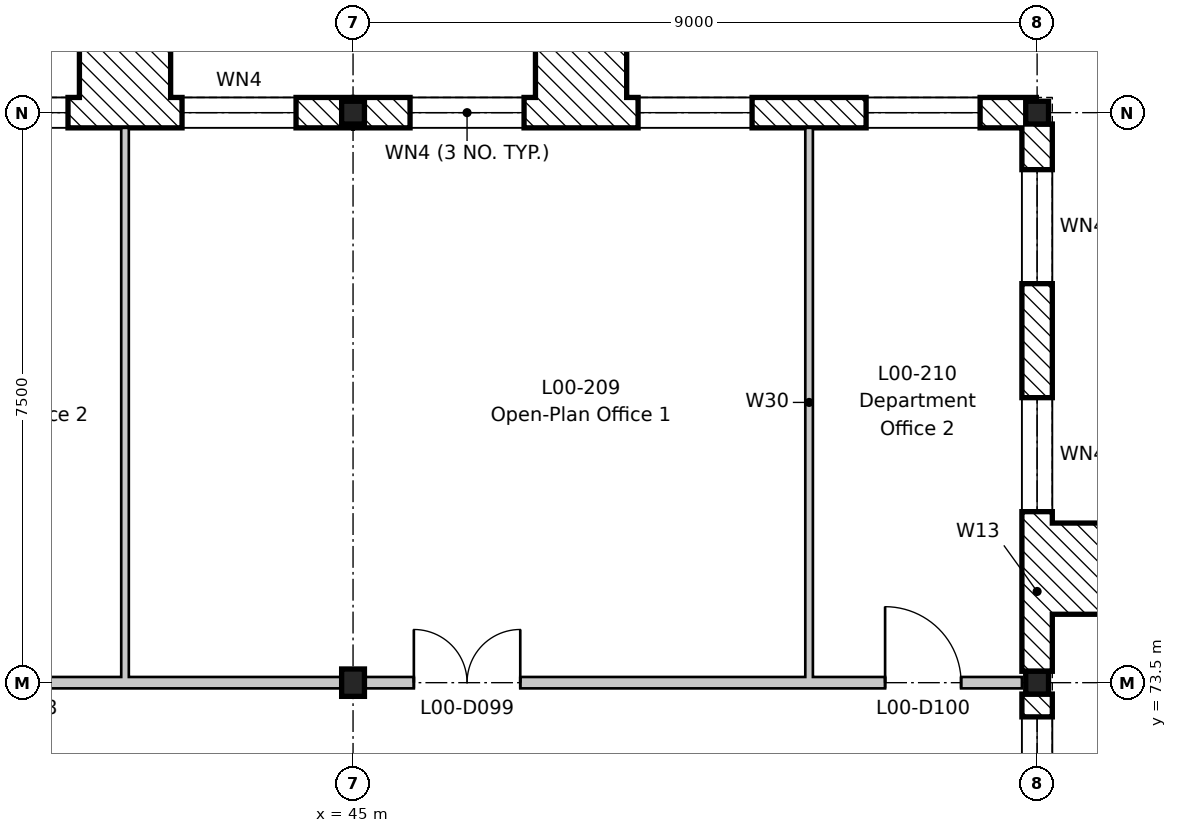
"""IFC4 building model, lengths in metres.
Left out: names, types, materials, properties, quantities, classifications, styles, units other than length and angle.
Written with IfcOpenShell. Run it as: python <this file> out.ifc"""

import sys

from ifc_helpers import new_model, si_unit, direction, frame, frame_2d, origin, origin_2d, place, context, subcontext, project, spatial, rectangle, i_section, extrude, element, fill, save


model = new_model("IFC4")
c1 = context("Model", 3, precision=1e-05, world=origin(), true_north=direction((0.0, 1.0)))
c2 = subcontext(c1, "Body", "Model", "MODEL_VIEW")
j1 = project(units=[si_unit("LENGTHUNIT", "METRE"), si_unit("PLANEANGLEUNIT", "RADIAN")], contexts=[c1])
p1 = place(None, origin())
s1 = spatial("IfcSite", under=j1, at=p1, CompositionType="ELEMENT")
p2 = place(p1, origin())
s2 = spatial("IfcBuilding", under=s1, at=p2, CompositionType="ELEMENT")
p3 = place(p2, origin())
s3 = spatial("IfcBuildingStorey", under=s2, at=p3, CompositionType="ELEMENT", Elevation=0.0)
p4 = place(p3, frame((45.0, 73.5, -0.6), z_axis=(0.0, 0.0, 1.0), x_axis=(1.0, 0.0, 0.0)))
e1 = element("IfcColumn", 1, at=p4, inside=s3, PredefinedType="COLUMN", context=c2, shape_type="SweptSolid", body=[
    extrude(i_section(OverallWidth=0.3, OverallDepth=0.36, WebThickness=0.012, FlangeThickness=0.022, FilletRadius=0.027, at=origin_2d()), origin(), (0.0, 0.0, 1.0), 5.8),
])
for number, where, z_axis, x_axis in (
    (2, (45.0, 81.0, -0.6), (0.0, 0.0, 1.0), (1.0, 0.0, 0.0)),
    (3, (54.0, 73.5, -0.6), (0.0, 0.0, 1.0), (1.0, 0.0, 0.0)),
    (4, (54.0, 81.0, -0.6), (0.0, 0.0, 1.0), (1.0, 0.0, 0.0)),
):
    element("IfcColumn", number, at=place(p3, frame(where, z_axis=z_axis, x_axis=x_axis)), inside=s3, PredefinedType="COLUMN", context=c2, shape_type="SweptSolid", body=[
        extrude(i_section(OverallWidth=0.3, OverallDepth=0.3, WebThickness=0.011, FlangeThickness=0.019, FilletRadius=0.027, at=origin_2d()), origin(), (0.0, 0.0, 1.0), 5.8),
    ])
p5 = place(p3, frame((36.01, 81.0, 0.0), z_axis=(0.0, 0.0, 1.0), x_axis=(1.0, 0.0, 0.0)))
e5 = element("IfcWall", 5, at=p5, inside=s3, PredefinedType="STANDARD", context=c2, shape_type="SweptSolid", body=[
    extrude(rectangle(XDim=8.979, YDim=0.4, at=frame_2d((4.49, 0.0))), origin(), (0.0, 0.0, 1.0), 4.8),
])
p6 = place(p5, frame((3.74, 0.0, 0.3)))
e6 = element("IfcOpeningElement", 6, at=p6, cuts=e5, PredefinedType="OPENING", context=c2, shape_type="SweptSolid", body=[
    extrude(rectangle(XDim=1.5, YDim=3.3, at=frame_2d((0.75, 1.65))), frame((0.0, 0.21, 0.0), z_axis=(0.0, -1.0, 0.0), x_axis=(1.0, 0.0, 0.0)), (0.0, 0.0, 1.0), 0.42),
])
p7 = place(p5, frame((6.74, 0.0, 0.3)))
e7 = element("IfcOpeningElement", 7, at=p7, cuts=e5, PredefinedType="OPENING", context=c2, shape_type="SweptSolid", body=[
    extrude(rectangle(XDim=1.5, YDim=3.3, at=frame_2d((0.75, 1.65))), frame((0.0, 0.21, 0.0), z_axis=(0.0, -1.0, 0.0), x_axis=(1.0, 0.0, 0.0)), (0.0, 0.0, 1.0), 0.42),
])
p8 = place(p3, frame((45.01, 81.0, 0.0), z_axis=(0.0, 0.0, 1.0), x_axis=(1.0, 0.0, 0.0)))
e8 = element("IfcWall", 8, at=p8, inside=s3, PredefinedType="STANDARD", context=c2, shape_type="SweptSolid", body=[
    extrude(rectangle(XDim=8.979, YDim=0.4, at=frame_2d((4.49, 0.0))), origin(), (0.0, 0.0, 1.0), 4.8),
])
p9 = place(p8, frame((0.74, 0.0, 0.3)))
e9 = element("IfcOpeningElement", 9, at=p9, cuts=e8, PredefinedType="OPENING", context=c2, shape_type="SweptSolid", body=[
    extrude(rectangle(XDim=1.5, YDim=3.3, at=frame_2d((0.75, 1.65))), frame((0.0, 0.21, 0.0), z_axis=(0.0, -1.0, 0.0), x_axis=(1.0, 0.0, 0.0)), (0.0, 0.0, 1.0), 0.42),
])
p10 = place(p8, frame((3.74, 0.0, 0.3)))
e10 = element("IfcOpeningElement", 10, at=p10, cuts=e8, PredefinedType="OPENING", context=c2, shape_type="SweptSolid", body=[
    extrude(rectangle(XDim=1.5, YDim=3.3, at=frame_2d((0.75, 1.65))), frame((0.0, 0.21, 0.0), z_axis=(0.0, -1.0, 0.0), x_axis=(1.0, 0.0, 0.0)), (0.0, 0.0, 1.0), 0.42),
])
p11 = place(p8, frame((6.74, 0.0, 0.3)))
e11 = element("IfcOpeningElement", 11, at=p11, cuts=e8, PredefinedType="OPENING", context=c2, shape_type="SweptSolid", body=[
    extrude(rectangle(XDim=1.5, YDim=3.3, at=frame_2d((0.75, 1.65))), frame((0.0, 0.21, 0.0), z_axis=(0.0, -1.0, 0.0), x_axis=(1.0, 0.0, 0.0)), (0.0, 0.0, 1.0), 0.42),
])
p12 = place(p3, frame((54.0, 73.35, 0.0), z_axis=(0.0, 0.0, 1.0), x_axis=(0.0, -1.0, 0.0)))
e12 = element("IfcWall", 12, at=p12, inside=s3, PredefinedType="STANDARD", context=c2, shape_type="SweptSolid", body=[
    extrude(rectangle(XDim=2.7, YDim=0.4, at=frame_2d((1.35, 0.0))), origin(), (0.0, 0.0, 1.0), 5.0),
])
p13 = place(p12, frame((0.3, 0.0, 0.9)))
e13 = element("IfcOpeningElement", 13, at=p13, cuts=e12, PredefinedType="OPENING", context=c2, shape_type="SweptSolid", body=[
    extrude(rectangle(XDim=2.1, YDim=2.1, at=frame_2d((1.05, 1.05))), frame((0.0, 0.21, 0.0), z_axis=(0.0, -1.0, 0.0), x_axis=(1.0, 0.0, 0.0)), (0.0, 0.0, 1.0), 0.42),
])
p14 = place(p3, frame((54.0, 80.85, 0.0), z_axis=(0.0, 0.0, 1.0), x_axis=(0.0, -1.0, 0.0)))
e14 = element("IfcWall", 14, at=p14, inside=s3, PredefinedType="STANDARD", context=c2, shape_type="SweptSolid", body=[
    extrude(rectangle(XDim=7.2, YDim=0.4, at=frame_2d((3.6, 0.0))), origin(), (0.0, 0.0, 1.0), 4.87),
])
p15 = place(p14, frame((3.6, 0.0, 0.3)))
e15 = element("IfcOpeningElement", 15, at=p15, cuts=e14, PredefinedType="OPENING", context=c2, shape_type="SweptSolid", body=[
    extrude(rectangle(XDim=1.5, YDim=3.3, at=frame_2d((0.75, 1.65))), frame((0.0, 0.21, 0.0), z_axis=(0.0, -1.0, 0.0), x_axis=(1.0, 0.0, 0.0)), (0.0, 0.0, 1.0), 0.42),
])
p16 = place(p14, frame((0.6, 0.0, 0.3)))
e16 = element("IfcOpeningElement", 16, at=p16, cuts=e14, PredefinedType="OPENING", context=c2, shape_type="SweptSolid", body=[
    extrude(rectangle(XDim=1.5, YDim=3.3, at=frame_2d((0.75, 1.65))), frame((0.0, 0.21, 0.0), z_axis=(0.0, -1.0, 0.0), x_axis=(1.0, 0.0, 0.0)), (0.0, 0.0, 1.0), 0.42),
])
for number, where, z_axis, x_axis in (
    (17, (41.4, 81.8, 0.0), (0.0, 0.0, 1.0), (1.0, 0.0, 0.0)),
    (18, (47.4, 81.8, 0.0), (0.0, 0.0, 1.0), (1.0, 0.0, 0.0)),
    (19, (54.8, 74.4, 0.0), (0.0, 0.0, 1.0), (0.0, 1.0, 0.0)),
):
    element("IfcWall", number, at=place(p3, frame(where, z_axis=z_axis, x_axis=x_axis)), inside=s3, PredefinedType="STANDARD", context=c2, shape_type="SweptSolid", body=[
        extrude(rectangle(XDim=1.2, YDim=1.2, at=frame_2d((0.6, 0.0))), origin(), (0.0, 0.0, 1.0), 5.4),
    ])
for number, where, z_axis, x_axis in (
    (20, (42.0, 73.575, 0.0), (0.0, 0.0, 1.0), (0.0, 1.0, 0.0)),
    (21, (51.0, 73.575, 0.0), (0.0, 0.0, 1.0), (0.0, 1.0, 0.0)),
):
    element("IfcWall", number, at=place(p3, frame(where, z_axis=z_axis, x_axis=x_axis)), inside=s3, PredefinedType="PARTITIONING", context=c2, shape_type="SweptSolid", body=[
        extrude(rectangle(XDim=7.225, YDim=0.1, at=frame_2d((3.613, 0.0))), origin(), (0.0, 0.0, 1.0), 5.2),
    ])
p17 = place(p3, frame((18.0, 73.5, 0.0), z_axis=(0.0, 0.0, 1.0), x_axis=(1.0, 0.0, 0.0)))
e22 = element("IfcWall", 22, at=p17, inside=s3, PredefinedType="PARTITIONING", context=c2, shape_type="SweptSolid", body=[
    extrude(rectangle(XDim=35.8, YDim=0.15, at=frame_2d((17.9, 0.0))), origin(), (0.0, 0.0, 1.0), 4.68),
])
p18 = place(p17, frame((10.3, 0.0, 0.0)))
e23 = element("IfcOpeningElement", 23, at=p18, cuts=e22, PredefinedType="OPENING", context=c2, shape_type="SweptSolid", body=[
    extrude(rectangle(XDim=1.4, YDim=2.1, at=frame_2d((0.7, 1.05))), frame((0.0, 0.085, 0.0), z_axis=(0.0, -1.0, 0.0), x_axis=(1.0, 0.0, 0.0)), (0.0, 0.0, 1.0), 0.17),
])
p19 = place(p17, frame((13.0, 0.0, 0.0)))
e24 = element("IfcOpeningElement", 24, at=p19, cuts=e22, PredefinedType="OPENING", context=c2, shape_type="SweptSolid", body=[
    extrude(rectangle(XDim=1.0, YDim=2.1, at=frame_2d((0.5, 1.05))), frame((0.0, 0.085, 0.0), z_axis=(0.0, -1.0, 0.0), x_axis=(1.0, 0.0, 0.0)), (0.0, 0.0, 1.0), 0.17),
])
p20 = place(p17, frame((18.75, 0.0, 0.0)))
e25 = element("IfcOpeningElement", 25, at=p20, cuts=e22, PredefinedType="OPENING", context=c2, shape_type="SweptSolid", body=[
    extrude(rectangle(XDim=1.0, YDim=2.1, at=frame_2d((0.5, 1.05))), frame((0.0, 0.085, 0.0), z_axis=(0.0, -1.0, 0.0), x_axis=(1.0, 0.0, 0.0)), (0.0, 0.0, 1.0), 0.17),
])
p21 = place(p17, frame((22.0, 0.0, 0.0)))
e26 = element("IfcOpeningElement", 26, at=p21, cuts=e22, PredefinedType="OPENING", context=c2, shape_type="SweptSolid", body=[
    extrude(rectangle(XDim=1.0, YDim=2.1, at=frame_2d((0.5, 1.05))), frame((0.0, 0.085, 0.0), z_axis=(0.0, -1.0, 0.0), x_axis=(1.0, 0.0, 0.0)), (0.0, 0.0, 1.0), 0.17),
])
p22 = place(p17, frame((27.8, 0.0, 0.0)))
e27 = element("IfcOpeningElement", 27, at=p22, cuts=e22, PredefinedType="OPENING", context=c2, shape_type="SweptSolid", body=[
    extrude(rectangle(XDim=1.4, YDim=2.1, at=frame_2d((0.7, 1.05))), frame((0.0, 0.085, 0.0), z_axis=(0.0, -1.0, 0.0), x_axis=(1.0, 0.0, 0.0)), (0.0, 0.0, 1.0), 0.17),
])
p23 = place(p17, frame((34.0, 0.0, 0.0)))
e28 = element("IfcOpeningElement", 28, at=p23, cuts=e22, PredefinedType="OPENING", context=c2, shape_type="SweptSolid", body=[
    extrude(rectangle(XDim=1.0, YDim=2.1, at=frame_2d((0.5, 1.05))), frame((0.0, 0.085, 0.0), z_axis=(0.0, -1.0, 0.0), x_axis=(1.0, 0.0, 0.0)), (0.0, 0.0, 1.0), 0.17),
])
p24 = place(p6, origin())
e29 = element("IfcWindow", 29, at=p24, inside=s3, PartitioningType="SINGLE_PANEL", PredefinedType="WINDOW", context=c2, shape_type="SweptSolid", body=[
    extrude(rectangle(XDim=1.5, YDim=3.3, at=frame_2d((0.75, 1.65))), frame((0.0, -0.12, 0.0), z_axis=(0.0, -1.0, 0.0), x_axis=(1.0, 0.0, 0.0)), (0.0, 0.0, 1.0), 0.06),
])
fill(e6, e29)
p25 = place(p7, origin())
e30 = element("IfcWindow", 30, at=p25, inside=s3, PartitioningType="SINGLE_PANEL", PredefinedType="WINDOW", context=c2, shape_type="SweptSolid", body=[
    extrude(rectangle(XDim=1.5, YDim=3.3, at=frame_2d((0.75, 1.65))), frame((0.0, -0.12, 0.0), z_axis=(0.0, -1.0, 0.0), x_axis=(1.0, 0.0, 0.0)), (0.0, 0.0, 1.0), 0.06),
])
fill(e7, e30)
p26 = place(p9, origin())
e31 = element("IfcWindow", 31, at=p26, inside=s3, PartitioningType="SINGLE_PANEL", PredefinedType="WINDOW", context=c2, shape_type="SweptSolid", body=[
    extrude(rectangle(XDim=1.5, YDim=3.3, at=frame_2d((0.75, 1.65))), frame((0.0, -0.12, 0.0), z_axis=(0.0, -1.0, 0.0), x_axis=(1.0, 0.0, 0.0)), (0.0, 0.0, 1.0), 0.06),
])
fill(e9, e31)
p27 = place(p10, origin())
e32 = element("IfcWindow", 32, at=p27, inside=s3, PartitioningType="SINGLE_PANEL", PredefinedType="WINDOW", context=c2, shape_type="SweptSolid", body=[
    extrude(rectangle(XDim=1.5, YDim=3.3, at=frame_2d((0.75, 1.65))), frame((0.0, -0.12, 0.0), z_axis=(0.0, -1.0, 0.0), x_axis=(1.0, 0.0, 0.0)), (0.0, 0.0, 1.0), 0.06),
])
fill(e10, e32)
p28 = place(p11, origin())
e33 = element("IfcWindow", 33, at=p28, inside=s3, PartitioningType="SINGLE_PANEL", PredefinedType="WINDOW", context=c2, shape_type="SweptSolid", body=[
    extrude(rectangle(XDim=1.5, YDim=3.3, at=frame_2d((0.75, 1.65))), frame((0.0, -0.12, 0.0), z_axis=(0.0, -1.0, 0.0), x_axis=(1.0, 0.0, 0.0)), (0.0, 0.0, 1.0), 0.06),
])
fill(e11, e33)
p29 = place(p13, origin())
e34 = element("IfcWindow", 34, at=p29, inside=s3, PartitioningType="SINGLE_PANEL", PredefinedType="WINDOW", context=c2, shape_type="SweptSolid", body=[
    extrude(rectangle(XDim=2.1, YDim=2.1, at=frame_2d((1.05, 1.05))), frame((0.0, -0.12, 0.0), z_axis=(0.0, -1.0, 0.0), x_axis=(1.0, 0.0, 0.0)), (0.0, 0.0, 1.0), 0.06),
])
fill(e13, e34)
p30 = place(p15, origin())
e35 = element("IfcWindow", 35, at=p30, inside=s3, PartitioningType="SINGLE_PANEL", PredefinedType="WINDOW", context=c2, shape_type="SweptSolid", body=[
    extrude(rectangle(XDim=1.5, YDim=3.3, at=frame_2d((0.75, 1.65))), frame((0.0, -0.12, 0.0), z_axis=(0.0, -1.0, 0.0), x_axis=(1.0, 0.0, 0.0)), (0.0, 0.0, 1.0), 0.06),
])
fill(e15, e35)
p31 = place(p16, origin())
e36 = element("IfcWindow", 36, at=p31, inside=s3, PartitioningType="SINGLE_PANEL", PredefinedType="WINDOW", context=c2, shape_type="SweptSolid", body=[
    extrude(rectangle(XDim=1.5, YDim=3.3, at=frame_2d((0.75, 1.65))), frame((0.0, -0.12, 0.0), z_axis=(0.0, -1.0, 0.0), x_axis=(1.0, 0.0, 0.0)), (0.0, 0.0, 1.0), 0.06),
])
fill(e16, e36)
p32 = place(p22, origin())
e37 = element("IfcDoor", 37, at=p32, inside=s3, OperationType="DOUBLE_DOOR_SINGLE_SWING", PredefinedType="DOOR", context=c2, shape_type="SweptSolid", body=[
    extrude(rectangle(XDim=1.4, YDim=2.1, at=frame_2d((0.7, 1.05))), frame((0.0, 0.025, 0.0), z_axis=(0.0, -1.0, 0.0), x_axis=(1.0, 0.0, 0.0)), (0.0, 0.0, 1.0), 0.05),
])
fill(e27, e37)
p33 = place(p23, origin())
e38 = element("IfcDoor", 38, at=p33, inside=s3, OperationType="SINGLE_SWING_LEFT", PredefinedType="DOOR", context=c2, shape_type="SweptSolid", body=[
    extrude(rectangle(XDim=1.0, YDim=2.1, at=frame_2d((0.5, 1.05))), frame((0.0, 0.025, 0.0), z_axis=(0.0, -1.0, 0.0), x_axis=(1.0, 0.0, 0.0)), (0.0, 0.0, 1.0), 0.05),
])
fill(e28, e38)
save(model, sys.argv[1])
